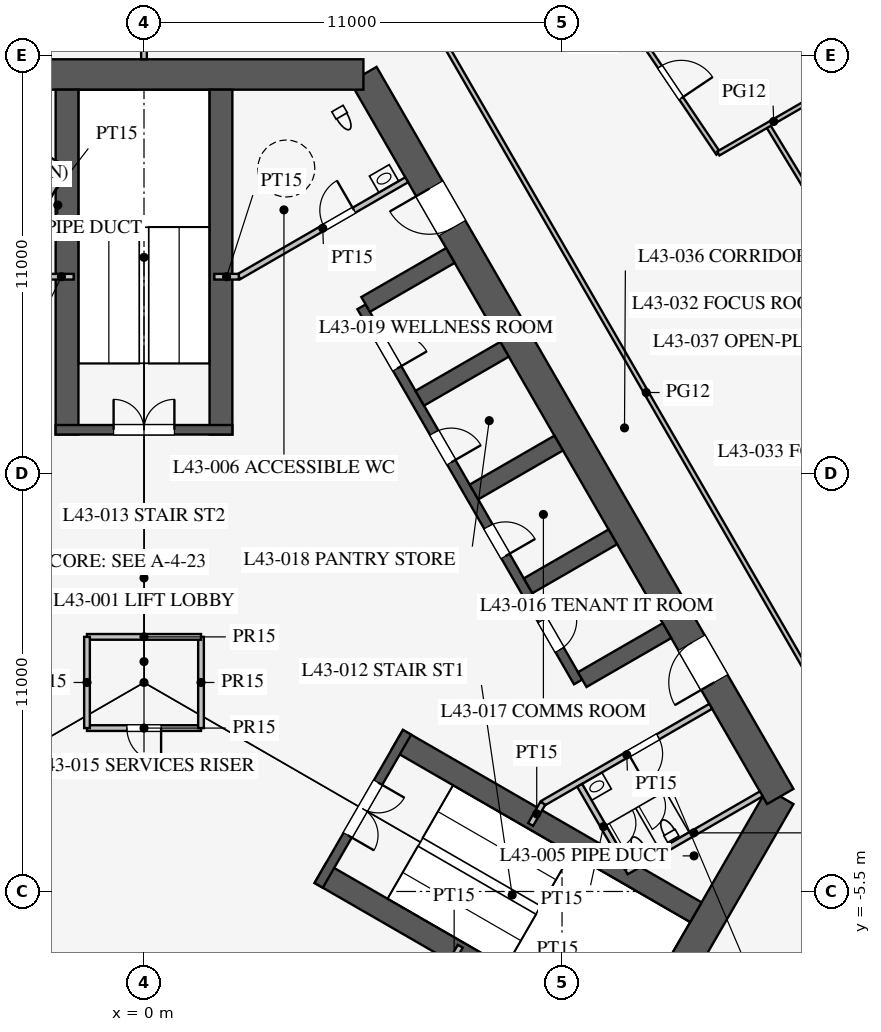
"""IFC4 building model, lengths in metres.
Left out: names, types, materials, properties, quantities, classifications, styles, units other than length and angle.
Written with IfcOpenShell. Run it as: python <this file> out.ifc"""

import sys

from ifc_helpers import new_model, si_unit, direction, frame, frame_2d, origin, place, context, subcontext, project, spatial, rectangle, extrude, element, fill, save


model = new_model("IFC4")
c1 = context("Model", 3, precision=1e-05, world=origin(), true_north=direction((0.0, 1.0)))
c2 = subcontext(c1, "Body", "Model", "MODEL_VIEW")
j1 = project(units=[si_unit("LENGTHUNIT", "METRE"), si_unit("PLANEANGLEUNIT", "RADIAN")], contexts=[c1])
p1 = place(None, origin())
s1 = spatial("IfcSite", under=j1, at=p1, CompositionType="ELEMENT")
p2 = place(p1, origin())
s2 = spatial("IfcBuilding", under=s1, at=p2, CompositionType="ELEMENT")
p3 = place(p2, frame((0.0, 0.0, 189.7)))
s3 = spatial("IfcBuildingStorey", under=s2, at=p3, CompositionType="ELEMENT", Elevation=189.7)
p4 = place(p3, frame((10.97, -13.0, 0.0), z_axis=(0.0, 0.0, 1.0), x_axis=(0.499995765644, 0.866027848477, 0.0)))
e1 = element("IfcWall", 1, at=p4, inside=s3, PredefinedType="SHEAR", context=c2, shape_type="SweptSolid", body=[
    extrude(rectangle(XDim=11.547, YDim=0.8, at=frame_2d((5.773, 0.0))), origin(), (0.0, 0.0, 1.0), 4.2),
])
p5 = place(p3, frame((16.743, -3.0, 0.0), z_axis=(0.0, 0.0, 1.0), x_axis=(-0.500002442456, 0.866023993627, 0.0)))
e2 = element("IfcWall", 2, at=p5, inside=s3, PredefinedType="SHEAR", context=c2, shape_type="SweptSolid", body=[
    extrude(rectangle(XDim=21.939, YDim=0.8, at=frame_2d((10.97, 0.0))), origin(), (0.0, 0.0, 1.0), 4.2),
])
p6 = place(p5, frame((17.27, 0.0, 0.0)))
e3 = element("IfcOpeningElement", 3, at=p6, cuts=e2, PredefinedType="OPENING", context=c2, shape_type="SweptSolid", body=[
    extrude(rectangle(XDim=1.2, YDim=2.1, at=frame_2d((0.6, 1.05))), frame((0.0, 0.41, 0.0), z_axis=(0.0, -1.0, 0.0), x_axis=(1.0, 0.0, 0.0)), (0.0, 0.0, 1.0), 0.82),
])
p7 = place(p5, frame((3.47, 0.0, 0.0)))
e4 = element("IfcOpeningElement", 4, at=p7, cuts=e2, PredefinedType="OPENING", context=c2, shape_type="SweptSolid", body=[
    extrude(rectangle(XDim=1.2, YDim=2.1, at=frame_2d((0.6, 1.05))), frame((0.0, 0.41, 0.0), z_axis=(0.0, -1.0, 0.0), x_axis=(1.0, 0.0, 0.0)), (0.0, 0.0, 1.0), 0.82),
])
p8 = place(p3, frame((5.773, 16.0, 0.0), z_axis=(0.0, 0.0, 1.0), x_axis=(-1.0, 0.0, 0.0)))
e5 = element("IfcWall", 5, at=p8, inside=s3, PredefinedType="SHEAR", context=c2, shape_type="SweptSolid", body=[
    extrude(rectangle(XDim=11.547, YDim=0.8, at=frame_2d((5.773, 0.0))), origin(), (0.0, 0.0, 1.0), 4.2),
])
p9 = place(p3, frame((11.424, 0.014, 0.0), z_axis=(0.0, 0.0, 1.0), x_axis=(-0.500001763848, 0.866024385424, 0.0)))
e6 = element("IfcWall", 6, at=p9, inside=s3, PredefinedType="SHEAR", context=c2, shape_type="SweptSolid", body=[
    extrude(rectangle(XDim=11.4, YDim=0.25, at=frame_2d((5.7, 0.0))), origin(), (0.0, 0.0, 1.0), 4.2),
])
p10 = place(p9, frame((0.975, 0.0, 0.0)))
e7 = element("IfcOpeningElement", 7, at=p10, cuts=e6, PredefinedType="OPENING", context=c2, shape_type="SweptSolid", body=[
    extrude(rectangle(XDim=0.9, YDim=2.1, at=frame_2d((0.45, 1.05))), frame((0.0, 0.135, 0.0), z_axis=(0.0, -1.0, 0.0), x_axis=(1.0, 0.0, 0.0)), (0.0, 0.0, 1.0), 0.27),
])
p11 = place(p9, frame((3.825, 0.0, 0.0)))
e8 = element("IfcOpeningElement", 8, at=p11, cuts=e6, PredefinedType="OPENING", context=c2, shape_type="SweptSolid", body=[
    extrude(rectangle(XDim=0.9, YDim=2.1, at=frame_2d((0.45, 1.05))), frame((0.0, 0.135, 0.0), z_axis=(0.0, -1.0, 0.0), x_axis=(1.0, 0.0, 0.0)), (0.0, 0.0, 1.0), 0.27),
])
p12 = place(p9, frame((6.675, 0.0, 0.0)))
e9 = element("IfcOpeningElement", 9, at=p12, cuts=e6, PredefinedType="OPENING", context=c2, shape_type="SweptSolid", body=[
    extrude(rectangle(XDim=0.9, YDim=2.1, at=frame_2d((0.45, 1.05))), frame((0.0, 0.135, 0.0), z_axis=(0.0, -1.0, 0.0), x_axis=(1.0, 0.0, 0.0)), (0.0, 0.0, 1.0), 0.27),
])
p13 = place(p9, frame((9.525, 0.0, 0.0)))
e10 = element("IfcOpeningElement", 10, at=p13, cuts=e6, PredefinedType="OPENING", context=c2, shape_type="SweptSolid", body=[
    extrude(rectangle(XDim=0.9, YDim=2.1, at=frame_2d((0.45, 1.05))), frame((0.0, 0.135, 0.0), z_axis=(0.0, -1.0, 0.0), x_axis=(1.0, 0.0, 0.0)), (0.0, 0.0, 1.0), 0.27),
])
for number, where, z_axis, x_axis in (
    (11, (11.532, 0.076, 0.0), (0.0, 0.0, 1.0), (0.866, 0.5, 0.0)),
    (12, (10.107, 2.544, 0.0), (0.0, 0.0, 1.0), (0.866, 0.5, 0.0)),
    (13, (8.682, 5.012, 0.0), (0.0, 0.0, 1.0), (0.866, 0.5, 0.0)),
    (14, (7.257, 7.481, 0.0), (0.0, 0.0, 1.0), (0.866, 0.5, 0.0)),
):
    element("IfcWall", number, at=place(p3, frame(where, z_axis=z_axis, x_axis=x_axis)), inside=s3, PredefinedType="SHEAR", context=c2, shape_type="SweptSolid", body=[
        extrude(rectangle(XDim=2.575, YDim=0.45, at=frame_2d((1.288, 0.0))), origin(), (0.0, 0.0, 1.0), 4.2),
    ])
p14 = place(p3, frame((5.832, 9.949, 0.0), z_axis=(0.0, 0.0, 1.0), x_axis=(0.866029291668, 0.499993265928, 0.0)))
e15 = element("IfcWall", 15, at=p14, inside=s3, PredefinedType="SHEAR", context=c2, shape_type="SweptSolid", body=[
    extrude(rectangle(XDim=2.575, YDim=0.45, at=frame_2d((1.288, 0.0))), origin(), (0.0, 0.0, 1.0), 4.2),
])
for number, where, z_axis, x_axis in (
    (16, (4.638, -5.016, 0.0), (0.0, 0.0, 1.0), (0.866, -0.5, 0.0)),
    (17, (6.663, -1.509, 0.0), (0.0, 0.0, 1.0), (0.866, -0.5, 0.0)),
):
    element("IfcWall", number, at=place(p3, frame(where, z_axis=z_axis, x_axis=x_axis)), inside=s3, PredefinedType="SHEAR", context=c2, shape_type="SweptSolid", body=[
        extrude(rectangle(XDim=9.075, YDim=0.6, at=frame_2d((4.538, 0.0))), origin(), (0.0, 0.0, 1.0), 4.2),
    ])
p15 = place(p3, frame((4.597, -5.339, 0.0), z_axis=(0.0, 0.0, 1.0), x_axis=(0.499984536904, 0.866034331223, 0.0)))
e18 = element("IfcWall", 18, at=p15, inside=s3, PredefinedType="SHEAR", context=c2, shape_type="SweptSolid", body=[
    extrude(rectangle(XDim=4.65, YDim=0.25, at=frame_2d((2.325, 0.0))), origin(), (0.0, 0.0, 1.0), 4.2),
])
p16 = place(p15, frame((1.525, 0.0, 0.0)))
e19 = element("IfcOpeningElement", 19, at=p16, cuts=e18, PredefinedType="OPENING", context=c2, shape_type="SweptSolid", body=[
    extrude(rectangle(XDim=1.6, YDim=2.1, at=frame_2d((0.8, 1.05))), frame((0.0, 0.135, 0.0), z_axis=(0.0, -1.0, 0.0), x_axis=(1.0, 0.0, 0.0)), (0.0, 0.0, 1.0), 0.27),
])
for number, where, z_axis, x_axis in (
    (20, (2.025, 6.525, 0.0), (0.0, 0.0, 1.0), (0.0, 1.0, 0.0)),
    (21, (-2.025, 6.525, 0.0), (0.0, 0.0, 1.0), (0.0, 1.0, 0.0)),
):
    element("IfcWall", number, at=place(p3, frame(where, z_axis=z_axis, x_axis=x_axis)), inside=s3, PredefinedType="SHEAR", context=c2, shape_type="SweptSolid", body=[
        extrude(rectangle(XDim=9.075, YDim=0.6, at=frame_2d((4.538, 0.0))), origin(), (0.0, 0.0, 1.0), 4.2),
    ])
p17 = place(p3, frame((2.325, 6.65, 0.0), z_axis=(0.0, 0.0, 1.0), x_axis=(-1.0, 0.0, 0.0)))
e22 = element("IfcWall", 22, at=p17, inside=s3, PredefinedType="SHEAR", context=c2, shape_type="SweptSolid", body=[
    extrude(rectangle(XDim=4.65, YDim=0.25, at=frame_2d((2.325, 0.0))), origin(), (0.0, 0.0, 1.0), 4.2),
])
p18 = place(p17, frame((1.525, 0.0, 0.0)))
e23 = element("IfcOpeningElement", 23, at=p18, cuts=e22, PredefinedType="OPENING", context=c2, shape_type="SweptSolid", body=[
    extrude(rectangle(XDim=1.6, YDim=2.1, at=frame_2d((0.8, 1.05))), frame((0.0, 0.135, 0.0), z_axis=(0.0, -1.0, 0.0), x_axis=(1.0, 0.0, 0.0)), (0.0, 0.0, 1.0), 0.27),
])
p19 = place(p3, frame((2.495, 10.678, 0.0), z_axis=(0.0, 0.0, 1.0), x_axis=(0.86602216432, 0.500005610874, 0.0)))
e24 = element("IfcWall", 24, at=p19, inside=s3, PredefinedType="PARTITIONING", context=c2, shape_type="SweptSolid", body=[
    extrude(rectangle(XDim=5.1, YDim=0.15, at=frame_2d((2.55, 0.0))), origin(), (0.0, 0.0, 1.0), 4.0),
])
p20 = place(p19, frame((2.6, 0.0, 0.0)))
e25 = element("IfcOpeningElement", 25, at=p20, cuts=e24, PredefinedType="OPENING", context=c2, shape_type="SweptSolid", body=[
    extrude(rectangle(XDim=0.9, YDim=2.1, at=frame_2d((0.45, 1.05))), frame((0.0, 0.085, 0.0), z_axis=(0.0, -1.0, 0.0), x_axis=(1.0, 0.0, 0.0)), (0.0, 0.0, 1.0), 0.17),
])
p21 = place(p3, frame((10.495, -3.178, 0.0), z_axis=(0.0, 0.0, 1.0), x_axis=(0.86602216432, 0.500005610874, 0.0)))
e26 = element("IfcWall", 26, at=p21, inside=s3, PredefinedType="PARTITIONING", context=c2, shape_type="SweptSolid", body=[
    extrude(rectangle(XDim=5.1, YDim=0.15, at=frame_2d((2.55, 0.0))), origin(), (0.0, 0.0, 1.0), 4.0),
])
p22 = place(p21, frame((2.6, 0.0, 0.0)))
e27 = element("IfcOpeningElement", 27, at=p22, cuts=e26, PredefinedType="OPENING", context=c2, shape_type="SweptSolid", body=[
    extrude(rectangle(XDim=0.9, YDim=2.1, at=frame_2d((0.45, 1.05))), frame((0.0, 0.085, 0.0), z_axis=(0.0, -1.0, 0.0), x_axis=(1.0, 0.0, 0.0)), (0.0, 0.0, 1.0), 0.17),
])
for number, where, z_axis, x_axis in (
    (28, (8.0, -7.5, 0.0), (0.0, 0.0, 1.0), (0.5, 0.866, 0.0)),
    (29, (10.495, -3.178, 0.0), (0.0, 0.0, 1.0), (-0.5, -0.866, 0.0)),
):
    element("IfcWall", number, at=place(p3, frame(where, z_axis=z_axis, x_axis=x_axis)), inside=s3, PredefinedType="PARTITIONING", context=c2, shape_type="SweptSolid", body=[
        extrude(rectangle(XDim=0.645, YDim=0.15, at=frame_2d((0.323, 0.0))), origin(), (0.0, 0.0, 1.0), 4.0),
    ])
for number, where, z_axis, x_axis in (
    (30, (2.495, 10.678, 0.0), (0.0, 0.0, 1.0), (-1.0, 0.0, 0.0)),
    (31, (-2.495, 10.678, 0.0), (0.0, 0.0, 1.0), (1.0, 0.0, 0.0)),
):
    element("IfcWall", number, at=place(p3, frame(where, z_axis=z_axis, x_axis=x_axis)), inside=s3, PredefinedType="PARTITIONING", context=c2, shape_type="SweptSolid", body=[
        extrude(rectangle(XDim=0.645, YDim=0.15, at=frame_2d((0.323, 0.0))), origin(), (0.0, 0.0, 1.0), 4.0),
    ])
p23 = place(p3, frame((12.691, -4.982, 0.0), z_axis=(0.0, 0.0, 1.0), x_axis=(0.8660249478, 0.500000789788, 0.0)))
e32 = element("IfcWall", 32, at=p23, inside=s3, PredefinedType="PARTITIONING", context=c2, shape_type="SweptSolid", body=[
    extrude(rectangle(XDim=4.1, YDim=0.15, at=frame_2d((2.05, 0.0))), origin(), (0.0, 0.0, 1.0), 4.0),
])
p24 = place(p3, frame((11.464, -2.706, 0.0), z_axis=(0.0, 0.0, 1.0), x_axis=(0.50001992892, -0.866013897511, 0.0)))
e33 = element("IfcWall", 33, at=p24, inside=s3, PredefinedType="PARTITIONING", context=c2, shape_type="SweptSolid", body=[
    extrude(rectangle(XDim=2.51, YDim=0.15, at=frame_2d((1.255, 0.0))), origin(), (0.0, 0.0, 1.0), 4.0),
])
p25 = place(p3, frame((-2.031, 13.482, 0.0), z_axis=(0.0, 0.0, 1.0), x_axis=(-0.866050731258, 0.499956128963, 0.0)))
e34 = element("IfcWall", 34, at=p25, inside=s3, PredefinedType="PARTITIONING", context=c2, shape_type="SweptSolid", body=[
    extrude(rectangle(XDim=4.1, YDim=0.15, at=frame_2d((2.05, 0.0))), origin(), (0.0, 0.0, 1.0), 4.0),
])
p26 = place(p3, frame((-3.389, 11.281, 0.0), z_axis=(0.0, 0.0, 1.0), x_axis=(0.499989096993, 0.866031698547, 0.0)))
e35 = element("IfcWall", 35, at=p26, inside=s3, PredefinedType="PARTITIONING", context=c2, shape_type="SweptSolid", body=[
    extrude(rectangle(XDim=2.51, YDim=0.15, at=frame_2d((1.255, 0.0))), origin(), (0.0, 0.0, 1.0), 4.0),
])
p27 = place(p3, frame((-1.5, -1.2, 0.0), z_axis=(0.0, 0.0, 1.0), x_axis=(1.0, 0.0, 0.0)))
e36 = element("IfcWall", 36, at=p27, inside=s3, PredefinedType="PARTITIONING", context=c2, shape_type="SweptSolid", body=[
    extrude(rectangle(XDim=3.0, YDim=0.15, at=frame_2d((1.5, 0.0))), origin(), (0.0, 0.0, 1.0), 4.0),
])
p28 = place(p27, frame((1.05, 0.0, 0.0)))
e37 = element("IfcOpeningElement", 37, at=p28, cuts=e36, PredefinedType="OPENING", context=c2, shape_type="SweptSolid", body=[
    extrude(rectangle(XDim=0.9, YDim=2.1, at=frame_2d((0.45, 1.05))), frame((0.0, 0.085, 0.0), z_axis=(0.0, -1.0, 0.0), x_axis=(1.0, 0.0, 0.0)), (0.0, 0.0, 1.0), 0.17),
])
p29 = place(p3, frame((1.5, -1.2, 0.0), z_axis=(0.0, 0.0, 1.0), x_axis=(0.0, 1.0, 0.0)))
e38 = element("IfcWall", 38, at=p29, inside=s3, PredefinedType="PARTITIONING", context=c2, shape_type="SweptSolid", body=[
    extrude(rectangle(XDim=2.4, YDim=0.15, at=frame_2d((1.2, 0.0))), origin(), (0.0, 0.0, 1.0), 4.0),
])
p30 = place(p3, frame((1.5, 1.2, 0.0), z_axis=(0.0, 0.0, 1.0), x_axis=(-1.0, 0.0, 0.0)))
e39 = element("IfcWall", 39, at=p30, inside=s3, PredefinedType="PARTITIONING", context=c2, shape_type="SweptSolid", body=[
    extrude(rectangle(XDim=3.0, YDim=0.15, at=frame_2d((1.5, 0.0))), origin(), (0.0, 0.0, 1.0), 4.0),
])
p31 = place(p3, frame((-1.5, 1.2, 0.0), z_axis=(0.0, 0.0, 1.0), x_axis=(0.0, -1.0, 0.0)))
e40 = element("IfcWall", 40, at=p31, inside=s3, PredefinedType="PARTITIONING", context=c2, shape_type="SweptSolid", body=[
    extrude(rectangle(XDim=2.4, YDim=0.15, at=frame_2d((1.2, 0.0))), origin(), (0.0, 0.0, 1.0), 4.0),
])
p32 = place(p3, frame((0.0, 16.4, 0.0), z_axis=(0.0, 0.0, 1.0), x_axis=(0.0, 1.0, 0.0)))
e41 = element("IfcWall", 41, at=p32, inside=s3, PredefinedType="PARTITIONING", context=c2, shape_type="SweptSolid", body=[
    extrude(rectangle(XDim=14.95, YDim=0.15, at=frame_2d((7.475, 0.0))), origin(), (0.0, 0.0, 1.0), 2.4),
])
p33 = place(p3, frame((26.415, -15.231, 0.0), z_axis=(0.0, 0.0, 1.0), x_axis=(-0.50000091641, 0.866024874695, 0.0)))
e42 = element("IfcWall", 42, at=p33, inside=s3, PredefinedType="PARTITIONING", context=c2, shape_type="SweptSolid", body=[
    extrude(rectangle(XDim=52.796, YDim=0.12, at=frame_2d((26.398, 0.0))), origin(), (0.0, 0.0, 1.0), 2.9),
])
p34 = place(p33, frame((10.2, 0.0, 0.15)))
e43 = element("IfcOpeningElement", 43, at=p34, cuts=e42, PredefinedType="OPENING", context=c2, shape_type="SweptSolid", body=[
    extrude(rectangle(XDim=1.8, YDim=2.1, at=frame_2d((0.9, 1.05))), frame((0.0, 0.07, 0.0), z_axis=(0.0, -1.0, 0.0), x_axis=(1.0, 0.0, 0.0)), (0.0, 0.0, 1.0), 0.14),
])
p35 = place(p33, frame((40.8, 0.0, 0.15)))
e44 = element("IfcOpeningElement", 44, at=p35, cuts=e42, PredefinedType="OPENING", context=c2, shape_type="SweptSolid", body=[
    extrude(rectangle(XDim=1.8, YDim=2.1, at=frame_2d((0.9, 1.05))), frame((0.0, 0.07, 0.0), z_axis=(0.0, -1.0, 0.0), x_axis=(1.0, 0.0, 0.0)), (0.0, 0.0, 1.0), 0.14),
])
p36 = place(p3, frame((18.75, 10.825, 0.0), z_axis=(0.0, 0.0, 1.0), x_axis=(-0.519790350351, 0.85429385558, 0.0)))
e45 = element("IfcWall", 45, at=p36, inside=s3, PredefinedType="PARTITIONING", context=c2, shape_type="SweptSolid", body=[
    extrude(rectangle(XDim=4.501, YDim=0.12, at=frame_2d((2.25, 0.0))), origin(), (0.0, 0.0, 1.0), 2.9),
])
p37 = place(p36, frame((1.8, 0.0, 0.15)))
e46 = element("IfcOpeningElement", 46, at=p37, cuts=e45, PredefinedType="OPENING", context=c2, shape_type="SweptSolid", body=[
    extrude(rectangle(XDim=0.9, YDim=2.1, at=frame_2d((0.45, 1.05))), frame((0.0, 0.07, 0.0), z_axis=(0.0, -1.0, 0.0), x_axis=(1.0, 0.0, 0.0)), (0.0, 0.0, 1.0), 0.14),
])
p38 = place(p3, frame((15.111, 13.921, 0.0), z_axis=(0.0, 0.0, 1.0), x_axis=(-0.558466624917, 0.829526991034, 0.0)))
e47 = element("IfcWall", 47, at=p38, inside=s3, PredefinedType="PARTITIONING", context=c2, shape_type="SweptSolid", body=[
    extrude(rectangle(XDim=4.511, YDim=0.12, at=frame_2d((2.255, 0.0))), origin(), (0.0, 0.0, 1.0), 2.9),
])
p39 = place(p38, frame((1.75, 0.0, 0.15)))
e48 = element("IfcOpeningElement", 48, at=p39, cuts=e47, PredefinedType="OPENING", context=c2, shape_type="SweptSolid", body=[
    extrude(rectangle(XDim=1.0, YDim=2.1, at=frame_2d((0.5, 1.05))), frame((0.0, 0.07, 0.0), z_axis=(0.0, -1.0, 0.0), x_axis=(1.0, 0.0, 0.0)), (0.0, 0.0, 1.0), 0.14),
])
p40 = place(p3, frame((15.111, 13.921, 0.0), z_axis=(0.0, 0.0, 1.0), x_axis=(0.865999698775, 0.50004451974, 0.0)))
e49 = element("IfcWall", 49, at=p40, inside=s3, PredefinedType="PARTITIONING", context=c2, shape_type="SweptSolid", body=[
    extrude(rectangle(XDim=3.368, YDim=0.12, at=frame_2d((1.684, 0.0))), origin(), (0.0, 0.0, 1.0), 2.6),
])
p41 = place(p3, frame((-0.016, 30.491, 0.0), z_axis=(0.0, 0.0, 1.0), x_axis=(-0.50000091641, -0.866024874695, 0.0)))
e50 = element("IfcWall", 50, at=p41, inside=s3, PredefinedType="PARTITIONING", context=c2, shape_type="SweptSolid", body=[
    extrude(rectangle(XDim=52.796, YDim=0.12, at=frame_2d((26.398, 0.0))), origin(), (0.0, 0.0, 1.0), 2.9),
])
p42 = place(p41, frame((10.2, 0.0, 0.15)))
e51 = element("IfcOpeningElement", 51, at=p42, cuts=e50, PredefinedType="OPENING", context=c2, shape_type="SweptSolid", body=[
    extrude(rectangle(XDim=1.8, YDim=2.1, at=frame_2d((0.9, 1.05))), frame((0.0, 0.07, 0.0), z_axis=(0.0, -1.0, 0.0), x_axis=(1.0, 0.0, 0.0)), (0.0, 0.0, 1.0), 0.14),
])
p43 = place(p41, frame((40.8, 0.0, 0.15)))
e52 = element("IfcOpeningElement", 52, at=p43, cuts=e50, PredefinedType="OPENING", context=c2, shape_type="SweptSolid", body=[
    extrude(rectangle(XDim=1.8, YDim=2.1, at=frame_2d((0.9, 1.05))), frame((0.0, 0.07, 0.0), z_axis=(0.0, -1.0, 0.0), x_axis=(1.0, 0.0, 0.0)), (0.0, 0.0, 1.0), 0.14),
])
p44 = place(p20, origin())
e53 = element("IfcDoor", 53, at=p44, inside=s3, OperationType="SINGLE_SWING_RIGHT", PredefinedType="DOOR", context=c2, shape_type="SweptSolid", body=[
    extrude(rectangle(XDim=0.9, YDim=2.1, at=frame_2d((0.45, 1.05))), frame((0.0, 0.025, 0.0), z_axis=(0.0, -1.0, 0.0), x_axis=(1.0, 0.0, 0.0)), (0.0, 0.0, 1.0), 0.05),
])
fill(e25, e53)
p45 = place(p22, frame((0.9, 0.0, 0.0), z_axis=(0.0, 0.0, 1.0), x_axis=(-1.0, 0.0, 0.0)))
e54 = element("IfcDoor", 54, at=p45, inside=s3, OperationType="SINGLE_SWING_RIGHT", PredefinedType="DOOR", context=c2, shape_type="SweptSolid", body=[
    extrude(rectangle(XDim=0.9, YDim=2.1, at=frame_2d((0.45, 1.05))), frame((0.0, 0.025, 0.0), z_axis=(0.0, -1.0, 0.0), x_axis=(1.0, 0.0, 0.0)), (0.0, 0.0, 1.0), 0.05),
])
fill(e27, e54)
p46 = place(p28, frame((0.9, 0.0, 0.0), z_axis=(0.0, 0.0, 1.0), x_axis=(-1.0, 0.0, 0.0)))
e55 = element("IfcDoor", 55, at=p46, inside=s3, OperationType="SINGLE_SWING_LEFT", PredefinedType="DOOR", context=c2, shape_type="SweptSolid", body=[
    extrude(rectangle(XDim=0.9, YDim=2.1, at=frame_2d((0.45, 1.05))), frame((0.0, 0.025, 0.0), z_axis=(0.0, -1.0, 0.0), x_axis=(1.0, 0.0, 0.0)), (0.0, 0.0, 1.0), 0.05),
])
fill(e37, e55)
p47 = place(p16, frame((1.6, 0.0, 0.0), z_axis=(0.0, 0.0, 1.0), x_axis=(-1.0, 0.0, 0.0)))
e56 = element("IfcDoor", 56, at=p47, inside=s3, OperationType="DOUBLE_DOOR_SINGLE_SWING", PredefinedType="DOOR", context=c2, shape_type="SweptSolid", body=[
    extrude(rectangle(XDim=1.6, YDim=2.1, at=frame_2d((0.8, 1.05))), frame((0.0, 0.025, 0.0), z_axis=(0.0, -1.0, 0.0), x_axis=(1.0, 0.0, 0.0)), (0.0, 0.0, 1.0), 0.05),
])
fill(e19, e56)
p48 = place(p18, frame((1.6, 0.0, 0.0), z_axis=(0.0, 0.0, 1.0), x_axis=(-1.0, 0.0, 0.0)))
e57 = element("IfcDoor", 57, at=p48, inside=s3, OperationType="DOUBLE_DOOR_SINGLE_SWING", PredefinedType="DOOR", context=c2, shape_type="SweptSolid", body=[
    extrude(rectangle(XDim=1.6, YDim=2.1, at=frame_2d((0.8, 1.05))), frame((0.0, 0.025, 0.0), z_axis=(0.0, -1.0, 0.0), x_axis=(1.0, 0.0, 0.0)), (0.0, 0.0, 1.0), 0.05),
])
fill(e23, e57)
p49 = place(p6, origin())
e58 = element("IfcDoor", 58, at=p49, inside=s3, OperationType="SINGLE_SWING_RIGHT", PredefinedType="DOOR", context=c2, shape_type="SweptSolid", body=[
    extrude(rectangle(XDim=1.2, YDim=2.1, at=frame_2d((0.6, 1.05))), frame((0.0, 0.025, 0.0), z_axis=(0.0, -1.0, 0.0), x_axis=(1.0, 0.0, 0.0)), (0.0, 0.0, 1.0), 0.05),
])
fill(e3, e58)
p50 = place(p7, origin())
e59 = element("IfcDoor", 59, at=p50, inside=s3, OperationType="SINGLE_SWING_LEFT", PredefinedType="DOOR", context=c2, shape_type="SweptSolid", body=[
    extrude(rectangle(XDim=1.2, YDim=2.1, at=frame_2d((0.6, 1.05))), frame((0.0, 0.025, 0.0), z_axis=(0.0, -1.0, 0.0), x_axis=(1.0, 0.0, 0.0)), (0.0, 0.0, 1.0), 0.05),
])
fill(e4, e59)
p51 = place(p10, frame((0.9, 0.0, 0.0), z_axis=(0.0, 0.0, 1.0), x_axis=(-1.0, 0.0, 0.0)))
e60 = element("IfcDoor", 60, at=p51, inside=s3, OperationType="SINGLE_SWING_LEFT", PredefinedType="DOOR", context=c2, shape_type="SweptSolid", body=[
    extrude(rectangle(XDim=0.9, YDim=2.1, at=frame_2d((0.45, 1.05))), frame((0.0, 0.025, 0.0), z_axis=(0.0, -1.0, 0.0), x_axis=(1.0, 0.0, 0.0)), (0.0, 0.0, 1.0), 0.05),
])
fill(e7, e60)
p52 = place(p11, frame((0.9, 0.0, 0.0), z_axis=(0.0, 0.0, 1.0), x_axis=(-1.0, 0.0, 0.0)))
e61 = element("IfcDoor", 61, at=p52, inside=s3, OperationType="SINGLE_SWING_RIGHT", PredefinedType="DOOR", context=c2, shape_type="SweptSolid", body=[
    extrude(rectangle(XDim=0.9, YDim=2.1, at=frame_2d((0.45, 1.05))), frame((0.0, 0.025, 0.0), z_axis=(0.0, -1.0, 0.0), x_axis=(1.0, 0.0, 0.0)), (0.0, 0.0, 1.0), 0.05),
])
fill(e8, e61)
p53 = place(p12, frame((0.9, 0.0, 0.0), z_axis=(0.0, 0.0, 1.0), x_axis=(-1.0, 0.0, 0.0)))
e62 = element("IfcDoor", 62, at=p53, inside=s3, OperationType="SINGLE_SWING_RIGHT", PredefinedType="DOOR", context=c2, shape_type="SweptSolid", body=[
    extrude(rectangle(XDim=0.9, YDim=2.1, at=frame_2d((0.45, 1.05))), frame((0.0, 0.025, 0.0), z_axis=(0.0, -1.0, 0.0), x_axis=(1.0, 0.0, 0.0)), (0.0, 0.0, 1.0), 0.05),
])
fill(e9, e62)
p54 = place(p13, frame((0.9, 0.0, 0.0), z_axis=(0.0, 0.0, 1.0), x_axis=(-1.0, 0.0, 0.0)))
e63 = element("IfcDoor", 63, at=p54, inside=s3, OperationType="SINGLE_SWING_RIGHT", PredefinedType="DOOR", context=c2, shape_type="SweptSolid", body=[
    extrude(rectangle(XDim=0.9, YDim=2.1, at=frame_2d((0.45, 1.05))), frame((0.0, 0.025, 0.0), z_axis=(0.0, -1.0, 0.0), x_axis=(1.0, 0.0, 0.0)), (0.0, 0.0, 1.0), 0.05),
])
fill(e10, e63)
p55 = place(p39, frame((1.0, 0.0, 0.0), z_axis=(0.0, 0.0, 1.0), x_axis=(-1.0, 0.0, 0.0)))
e64 = element("IfcDoor", 64, at=p55, inside=s3, OperationType="SINGLE_SWING_RIGHT", PredefinedType="DOOR", context=c2, shape_type="SweptSolid", body=[
    extrude(rectangle(XDim=1.0, YDim=2.1, at=frame_2d((0.5, 1.05))), frame((0.0, 0.025, 0.0), z_axis=(0.0, -1.0, 0.0), x_axis=(1.0, 0.0, 0.0)), (0.0, 0.0, 1.0), 0.05),
])
fill(e48, e64)
save(model, sys.argv[1])
